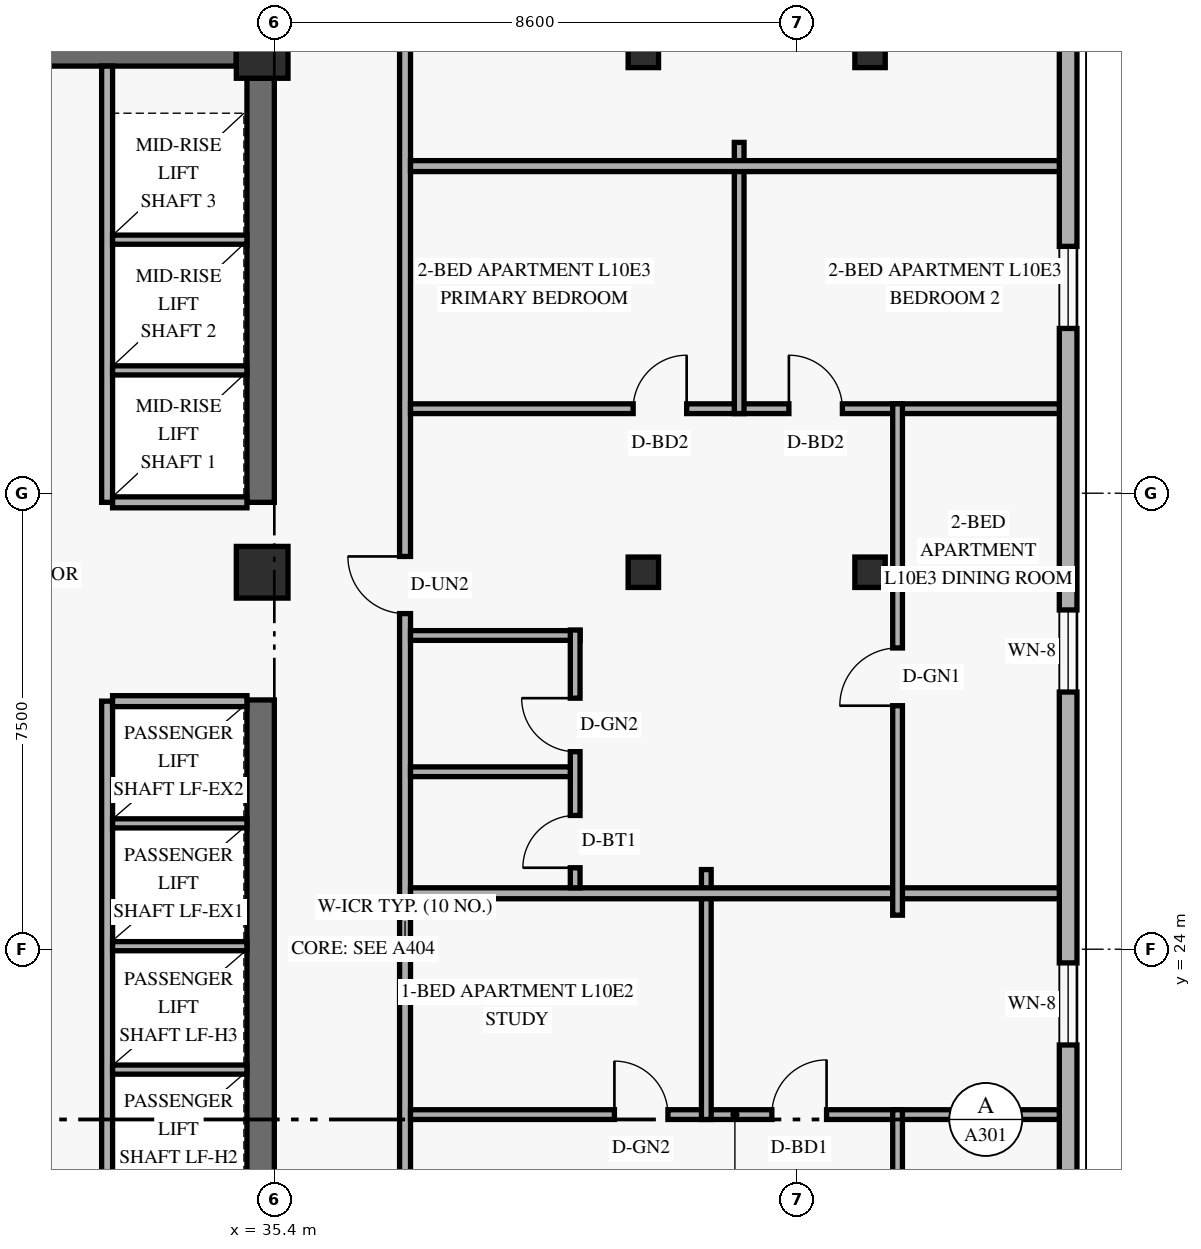
"""IFC4 building model, lengths in metres.
Left out: names, types, materials, properties, quantities, classifications, styles, units other than length and angle.
Written with IfcOpenShell. Run it as: python <this file> out.ifc"""

import sys

from ifc_helpers import new_model, si_unit, direction, frame, frame_2d, origin, origin_2d, place, context, subcontext, project, spatial, rectangle, hollow_rectangle, extrude, element, fill, save


model = new_model("IFC4")
c1 = context("Model", 3, precision=1e-05, world=origin(), true_north=direction((0.0, 1.0)))
c2 = subcontext(c1, "Body", "Model", "MODEL_VIEW")
j1 = project(units=[si_unit("LENGTHUNIT", "METRE"), si_unit("PLANEANGLEUNIT", "RADIAN")], contexts=[c1])
p1 = place(None, origin())
s1 = spatial("IfcSite", under=j1, at=p1, CompositionType="ELEMENT")
p2 = place(p1, origin())
s2 = spatial("IfcBuilding", under=s1, at=p2, CompositionType="ELEMENT")
p3 = place(p2, frame((0.0, 0.0, 42.0)))
s3 = spatial("IfcBuildingStorey", under=s2, at=p3, CompositionType="ELEMENT", Elevation=42.0)
p4 = place(p3, frame((35.175, 17.975, 0.0), z_axis=(0.0, 0.0, 1.0), x_axis=(0.0, 1.0, 0.0)))
e1 = element("IfcWall", 1, at=p4, inside=s3, PredefinedType="SHEAR", context=c2, shape_type="SweptSolid", body=[
    extrude(rectangle(XDim=10.125, YDim=0.45, at=frame_2d((5.062, 0.0))), origin(), (0.0, 0.0, 1.0), 2.667),
])
p5 = place(p3, frame((35.175, 31.35, 0.0), z_axis=(0.0, 0.0, 1.0), x_axis=(0.0, 1.0, 0.0)))
e2 = element("IfcWall", 2, at=p5, inside=s3, PredefinedType="SHEAR", context=c2, shape_type="SweptSolid", body=[
    extrude(rectangle(XDim=6.975, YDim=0.45, at=frame_2d((3.487, 0.0))), origin(), (0.0, 0.0, 1.0), 2.667),
])
p6 = place(p3, frame((24.625, 38.75, 0.0), z_axis=(0.0, 0.0, 1.0), x_axis=(1.0, 0.0, 0.0)))
e3 = element("IfcWall", 3, at=p6, inside=s3, PredefinedType="SHEAR", context=c2, shape_type="SweptSolid", body=[
    extrude(rectangle(XDim=10.15, YDim=0.45, at=frame_2d((5.075, 0.0))), origin(), (0.0, 0.0, 1.0), 3.36),
])
for number, where, z_axis, x_axis in (
    (4, (35.2, 30.2, 0.0), (0.0, 0.0, 1.0), (1.0, 0.0, 0.0)),
    (5, (35.2, 38.75, 0.0), (0.0, 0.0, 1.0), (1.0, 0.0, 0.0)),
):
    element("IfcColumn", number, at=place(p3, frame(where, z_axis=z_axis, x_axis=x_axis)), inside=s3, PredefinedType="COLUMN", context=c2, shape_type="SweptSolid", body=[
        extrude(rectangle(XDim=0.85, YDim=0.85, at=origin_2d()), origin(), (0.0, 0.0, 1.0), 3.6),
    ])
for number, where, z_axis, x_axis in (
    (6, (41.406, 30.2, 0.0), (0.035, 0.0, 0.999), (0.0, 1.0, 0.0)),
    (7, (41.406, 38.75, 0.0), (0.035, 0.0, 0.999), (0.0, 1.0, 0.0)),
):
    element("IfcColumn", number, at=place(p3, frame(where, z_axis=z_axis, x_axis=x_axis)), inside=s3, PredefinedType="COLUMN", context=c2, shape_type="SweptSolid", body=[
        extrude(hollow_rectangle(XDim=0.5, YDim=0.5, WallThickness=0.022, at=origin_2d()), origin(), (0.0, 0.0, 1.0), 3.602),
    ])
for number, where, z_axis, x_axis in (
    (8, (45.093, 30.2, 0.0), (0.058, 0.0, 0.998), (0.0, 1.0, 0.0)),
    (9, (45.093, 38.75, 0.0), (0.058, 0.0, 0.998), (0.0, 1.0, 0.0)),
):
    element("IfcColumn", number, at=place(p3, frame(where, z_axis=z_axis, x_axis=x_axis)), inside=s3, PredefinedType="COLUMN", context=c2, shape_type="SweptSolid", body=[
        extrude(hollow_rectangle(XDim=0.5, YDim=0.5, WallThickness=0.022, at=origin_2d()), origin(), (0.0, 0.0, 1.0), 3.606),
    ])
p7 = place(p3, frame((48.455, 4.62, 0.0), z_axis=(0.0, 0.0, 1.0), x_axis=(0.0, 1.0, 0.0)))
e10 = element("IfcWall", 10, at=p7, inside=s3, PredefinedType="SOLIDWALL", context=c2, shape_type="SweptSolid", body=[
    extrude(rectangle(XDim=38.76, YDim=0.29, at=frame_2d((19.38, 0.0))), origin(), (0.0, 0.0, 1.0), 3.36),
])
p8 = place(p7, frame((3.035, 0.0, 0.85)))
e11 = element("IfcOpeningElement", 11, at=p8, cuts=e10, PredefinedType="OPENING", context=c2, shape_type="SweptSolid", body=[
    extrude(rectangle(XDim=1.35, YDim=1.55, at=frame_2d((0.675, 0.775))), frame((0.0, 0.155, 0.0), z_axis=(0.0, -1.0, 0.0), x_axis=(1.0, 0.0, 0.0)), (0.0, 0.0, 1.0), 0.31),
])
p9 = place(p7, frame((11.365, 0.0, 0.85)))
e12 = element("IfcOpeningElement", 12, at=p9, cuts=e10, PredefinedType="OPENING", context=c2, shape_type="SweptSolid", body=[
    extrude(rectangle(XDim=1.35, YDim=1.55, at=frame_2d((0.675, 0.775))), frame((0.0, 0.155, 0.0), z_axis=(0.0, -1.0, 0.0), x_axis=(1.0, 0.0, 0.0)), (0.0, 0.0, 1.0), 0.31),
])
p10 = place(p7, frame((17.805, 0.0, 0.85)))
e13 = element("IfcOpeningElement", 13, at=p10, cuts=e10, PredefinedType="OPENING", context=c2, shape_type="SweptSolid", body=[
    extrude(rectangle(XDim=1.35, YDim=1.55, at=frame_2d((0.675, 0.775))), frame((0.0, 0.155, 0.0), z_axis=(0.0, -1.0, 0.0), x_axis=(1.0, 0.0, 0.0)), (0.0, 0.0, 1.0), 0.31),
])
p11 = place(p7, frame((23.61, 0.0, 0.85)))
e14 = element("IfcOpeningElement", 14, at=p11, cuts=e10, PredefinedType="OPENING", context=c2, shape_type="SweptSolid", body=[
    extrude(rectangle(XDim=1.35, YDim=1.55, at=frame_2d((0.675, 0.775))), frame((0.0, 0.155, 0.0), z_axis=(0.0, -1.0, 0.0), x_axis=(1.0, 0.0, 0.0)), (0.0, 0.0, 1.0), 0.31),
])
p12 = place(p7, frame((29.59, 0.0, 0.85)))
e15 = element("IfcOpeningElement", 15, at=p12, cuts=e10, PredefinedType="OPENING", context=c2, shape_type="SweptSolid", body=[
    extrude(rectangle(XDim=1.35, YDim=1.55, at=frame_2d((0.675, 0.775))), frame((0.0, 0.155, 0.0), z_axis=(0.0, -1.0, 0.0), x_axis=(1.0, 0.0, 0.0)), (0.0, 0.0, 1.0), 0.31),
])
p13 = place(p7, frame((34.835, 0.0, 0.85)))
e16 = element("IfcOpeningElement", 16, at=p13, cuts=e10, PredefinedType="OPENING", context=c2, shape_type="SweptSolid", body=[
    extrude(rectangle(XDim=1.35, YDim=1.55, at=frame_2d((0.675, 0.775))), frame((0.0, 0.155, 0.0), z_axis=(0.0, -1.0, 0.0), x_axis=(1.0, 0.0, 0.0)), (0.0, 0.0, 1.0), 0.31),
])
p14 = place(p3, frame((32.65, 18.02, 0.0), z_axis=(0.0, 0.0, 1.0), x_axis=(0.0, 1.0, 0.0)))
e17 = element("IfcWall", 17, at=p14, inside=s3, PredefinedType="STANDARD", context=c2, shape_type="SweptSolid", body=[
    extrude(rectangle(XDim=10.06, YDim=0.18, at=frame_2d((5.03, 0.0))), origin(), (0.0, 0.0, 1.0), 3.36),
])
p15 = place(p3, frame((32.74, 28.08, 0.0), z_axis=(0.0, 0.0, 1.0), x_axis=(1.0, 0.0, 0.0)))
e18 = element("IfcWall", 18, at=p15, inside=s3, PredefinedType="STANDARD", context=c2, shape_type="SweptSolid", body=[
    extrude(rectangle(XDim=2.21, YDim=0.18, at=frame_2d((1.105, 0.0))), origin(), (0.0, 0.0, 1.0), 3.36),
])
for number, where, z_axis, x_axis in (
    (19, (32.74, 22.02, 0.0), (0.0, 0.0, 1.0), (1.0, 0.0, 0.0)),
    (20, (32.74, 24.05, 0.0), (0.0, 0.0, 1.0), (1.0, 0.0, 0.0)),
    (21, (32.74, 26.07, 0.0), (0.0, 0.0, 1.0), (1.0, 0.0, 0.0)),
):
    element("IfcWall", number, at=place(p3, frame(where, z_axis=z_axis, x_axis=x_axis)), inside=s3, PredefinedType="STANDARD", context=c2, shape_type="SweptSolid", body=[
        extrude(rectangle(XDim=2.21, YDim=0.15, at=frame_2d((1.105, 0.0))), origin(), (0.0, 0.0, 1.0), 3.36),
    ])
p16 = place(p3, frame((32.65, 31.35, 0.0), z_axis=(0.0, 0.0, 1.0), x_axis=(0.0, 1.0, 0.0)))
e22 = element("IfcWall", 22, at=p16, inside=s3, PredefinedType="STANDARD", context=c2, shape_type="SweptSolid", body=[
    extrude(rectangle(XDim=7.175, YDim=0.18, at=frame_2d((3.587, 0.0))), origin(), (0.0, 0.0, 1.0), 3.36),
])
p17 = place(p3, frame((32.74, 31.35, 0.0), z_axis=(0.0, 0.0, 1.0), x_axis=(1.0, 0.0, 0.0)))
e23 = element("IfcWall", 23, at=p17, inside=s3, PredefinedType="STANDARD", context=c2, shape_type="SweptSolid", body=[
    extrude(rectangle(XDim=2.21, YDim=0.18, at=frame_2d((1.105, 0.0))), origin(), (0.0, 0.0, 1.0), 3.36),
])
for number, where, z_axis, x_axis in (
    (24, (32.74, 33.52, 0.0), (0.0, 0.0, 1.0), (1.0, 0.0, 0.0)),
    (25, (32.74, 35.67, 0.0), (0.0, 0.0, 1.0), (1.0, 0.0, 0.0)),
):
    element("IfcWall", number, at=place(p3, frame(where, z_axis=z_axis, x_axis=x_axis)), inside=s3, PredefinedType="STANDARD", context=c2, shape_type="SweptSolid", body=[
        extrude(rectangle(XDim=2.21, YDim=0.15, at=frame_2d((1.105, 0.0))), origin(), (0.0, 0.0, 1.0), 3.36),
    ])
p18 = place(p3, frame((37.55, 1.29, 0.0), z_axis=(0.0, 0.0, 1.0), x_axis=(0.0, 1.0, 0.0)))
e26 = element("IfcWall", 26, at=p18, inside=s3, PredefinedType="STANDARD", context=c2, shape_type="SweptSolid", body=[
    extrude(rectangle(XDim=45.42, YDim=0.18, at=frame_2d((22.71, 0.0))), origin(), (0.0, 0.0, 1.0), 2.649),
])
p19 = place(p18, frame((4.46, 0.0, 0.0)))
e27 = element("IfcOpeningElement", 27, at=p19, cuts=e26, PredefinedType="OPENING", context=c2, shape_type="SweptSolid", body=[
    extrude(rectangle(XDim=0.94, YDim=2.15, at=frame_2d((0.47, 1.075))), frame((0.0, 0.1, 0.0), z_axis=(0.0, -1.0, 0.0), x_axis=(1.0, 0.0, 0.0)), (0.0, 0.0, 1.0), 0.2),
])
p20 = place(p18, frame((15.907, 0.0, 0.0)))
e28 = element("IfcOpeningElement", 28, at=p20, cuts=e26, PredefinedType="OPENING", context=c2, shape_type="SweptSolid", body=[
    extrude(rectangle(XDim=0.94, YDim=2.15, at=frame_2d((0.47, 1.075))), frame((0.0, 0.1, 0.0), z_axis=(0.0, -1.0, 0.0), x_axis=(1.0, 0.0, 0.0)), (0.0, 0.0, 1.0), 0.2),
])
p21 = place(p18, frame((28.23, 0.0, 0.0)))
e29 = element("IfcOpeningElement", 29, at=p21, cuts=e26, PredefinedType="OPENING", context=c2, shape_type="SweptSolid", body=[
    extrude(rectangle(XDim=0.94, YDim=2.15, at=frame_2d((0.47, 1.075))), frame((0.0, 0.1, 0.0), z_axis=(0.0, -1.0, 0.0), x_axis=(1.0, 0.0, 0.0)), (0.0, 0.0, 1.0), 0.2),
])
p22 = place(p18, frame((40.02, 0.0, 0.0)))
e30 = element("IfcOpeningElement", 30, at=p22, cuts=e26, PredefinedType="OPENING", context=c2, shape_type="SweptSolid", body=[
    extrude(rectangle(XDim=0.94, YDim=2.15, at=frame_2d((0.47, 1.075))), frame((0.0, 0.1, 0.0), z_axis=(0.0, -1.0, 0.0), x_axis=(1.0, 0.0, 0.0)), (0.0, 0.0, 1.0), 0.2),
])
p23 = place(p3, frame((35.42, 38.75, 0.0), z_axis=(0.0, 0.0, 1.0), x_axis=(0.0, 1.0, 0.0)))
e31 = element("IfcWall", 31, at=p23, inside=s3, PredefinedType="STANDARD", context=c2, shape_type="SweptSolid", body=[
    extrude(rectangle(XDim=0.51, YDim=0.18, at=frame_2d((0.255, 0.0))), origin(), (0.0, 0.0, 1.0), 3.36),
])
p24 = place(p3, frame((37.64, 21.28, 0.0), z_axis=(0.0, 0.0, 1.0), x_axis=(1.0, 0.0, 0.0)))
e32 = element("IfcWall", 32, at=p24, inside=s3, PredefinedType="PARTITIONING", context=c2, shape_type="SweptSolid", body=[
    extrude(rectangle(XDim=10.67, YDim=0.16, at=frame_2d((5.335, 0.0))), origin(), (0.0, 0.0, 1.0), 2.649),
])
p25 = place(p24, frame((3.353, 0.0, 0.0)))
e33 = element("IfcOpeningElement", 33, at=p25, cuts=e32, PredefinedType="OPENING", context=c2, shape_type="SweptSolid", body=[
    extrude(rectangle(XDim=0.88, YDim=2.12, at=frame_2d((0.44, 1.06))), frame((0.0, 0.09, 0.0), z_axis=(0.0, -1.0, 0.0), x_axis=(1.0, 0.0, 0.0)), (0.0, 0.0, 1.0), 0.18),
])
p26 = place(p24, frame((5.942, 0.0, 0.0)))
e34 = element("IfcOpeningElement", 34, at=p26, cuts=e32, PredefinedType="OPENING", context=c2, shape_type="SweptSolid", body=[
    extrude(rectangle(XDim=0.9, YDim=2.14, at=frame_2d((0.45, 1.07))), frame((0.0, 0.09, 0.0), z_axis=(0.0, -1.0, 0.0), x_axis=(1.0, 0.0, 0.0)), (0.0, 0.0, 1.0), 0.18),
])
p27 = place(p3, frame((45.65, 11.68, 0.0), z_axis=(0.0, 0.0, 1.0), x_axis=(0.0, 1.0, 0.0)))
e35 = element("IfcWall", 35, at=p27, inside=s3, PredefinedType="PARTITIONING", context=c2, shape_type="SweptSolid", body=[
    extrude(rectangle(XDim=9.68, YDim=0.16, at=frame_2d((4.84, 0.0))), origin(), (0.0, 0.0, 1.0), 3.36),
])
p28 = place(p27, frame((4.08, 0.0, 0.0)))
e36 = element("IfcOpeningElement", 36, at=p28, cuts=e35, PredefinedType="OPENING", context=c2, shape_type="SweptSolid", body=[
    extrude(rectangle(XDim=0.95, YDim=2.15, at=frame_2d((0.475, 1.075))), frame((0.0, 0.09, 0.0), z_axis=(0.0, -1.0, 0.0), x_axis=(1.0, 0.0, 0.0)), (0.0, 0.0, 1.0), 0.18),
])
p29 = place(p3, frame((42.504, 21.2, 0.0), z_axis=(0.0, 0.0, 1.0), x_axis=(0.0, 1.0, 0.0)))
e37 = element("IfcWall", 37, at=p29, inside=s3, PredefinedType="PARTITIONING", context=c2, shape_type="SweptSolid", body=[
    extrude(rectangle(XDim=4.11, YDim=0.16, at=frame_2d((2.055, 0.0))), origin(), (0.0, 0.0, 1.0), 2.932),
])
p30 = place(p3, frame((37.64, 24.92, 0.0), z_axis=(0.0, 0.0, 1.0), x_axis=(1.0, 0.0, 0.0)))
e38 = element("IfcWall", 38, at=p30, inside=s3, PredefinedType="PARTITIONING", context=c2, shape_type="SweptSolid", body=[
    extrude(rectangle(XDim=10.67, YDim=0.18, at=frame_2d((5.335, 0.0))), origin(), (0.0, 0.0, 1.0), 2.649),
])
p31 = place(p3, frame((37.64, 32.89, 0.0), z_axis=(0.0, 0.0, 1.0), x_axis=(1.0, 0.0, 0.0)))
e39 = element("IfcWall", 39, at=p31, inside=s3, PredefinedType="PARTITIONING", context=c2, shape_type="SweptSolid", body=[
    extrude(rectangle(XDim=10.67, YDim=0.16, at=frame_2d((5.335, 0.0))), origin(), (0.0, 0.0, 1.0), 2.649),
])
p32 = place(p31, frame((3.662, 0.0, 0.0)))
e40 = element("IfcOpeningElement", 40, at=p32, cuts=e39, PredefinedType="OPENING", context=c2, shape_type="SweptSolid", body=[
    extrude(rectangle(XDim=0.88, YDim=2.14, at=frame_2d((0.44, 1.07))), frame((0.0, 0.09, 0.0), z_axis=(0.0, -1.0, 0.0), x_axis=(1.0, 0.0, 0.0)), (0.0, 0.0, 1.0), 0.18),
])
p33 = place(p31, frame((6.222, 0.0, 0.0)))
e41 = element("IfcOpeningElement", 41, at=p33, cuts=e39, PredefinedType="OPENING", context=c2, shape_type="SweptSolid", body=[
    extrude(rectangle(XDim=0.88, YDim=2.14, at=frame_2d((0.44, 1.07))), frame((0.0, 0.09, 0.0), z_axis=(0.0, -1.0, 0.0), x_axis=(1.0, 0.0, 0.0)), (0.0, 0.0, 1.0), 0.18),
])
p34 = place(p3, frame((37.64, 29.16, 0.0), z_axis=(0.0, 0.0, 1.0), x_axis=(1.0, 0.0, 0.0)))
e42 = element("IfcWall", 42, at=p34, inside=s3, PredefinedType="PLUMBINGWALL", context=c2, shape_type="SweptSolid", body=[
    extrude(rectangle(XDim=2.788, YDim=0.16, at=frame_2d((1.394, 0.0))), origin(), (0.0, 0.0, 1.0), 3.36),
])
p35 = place(p3, frame((40.348, 25.01, 0.0), z_axis=(0.0, 0.0, 1.0), x_axis=(0.0, 1.0, 0.0)))
e43 = element("IfcWall", 43, at=p35, inside=s3, PredefinedType="PLUMBINGWALL", context=c2, shape_type="SweptSolid", body=[
    extrude(rectangle(XDim=4.24, YDim=0.16, at=frame_2d((2.12, 0.0))), origin(), (0.0, 0.0, 1.0), 3.36),
])
p36 = place(p35, frame((0.33, 0.0, 0.0)))
e44 = element("IfcOpeningElement", 44, at=p36, cuts=e43, PredefinedType="OPENING", context=c2, shape_type="SweptSolid", body=[
    extrude(rectangle(XDim=0.86, YDim=2.12, at=frame_2d((0.43, 1.06))), frame((0.0, 0.09, 0.0), z_axis=(0.0, -1.0, 0.0), x_axis=(1.0, 0.0, 0.0)), (0.0, 0.0, 1.0), 0.18),
])
p37 = place(p35, frame((2.239, 0.0, 0.0)))
e45 = element("IfcOpeningElement", 45, at=p37, cuts=e43, PredefinedType="OPENING", context=c2, shape_type="SweptSolid", body=[
    extrude(rectangle(XDim=0.88, YDim=2.12, at=frame_2d((0.44, 1.06))), frame((0.0, 0.09, 0.0), z_axis=(0.0, -1.0, 0.0), x_axis=(1.0, 0.0, 0.0)), (0.0, 0.0, 1.0), 0.18),
])
p38 = place(p3, frame((37.64, 26.919, 0.0), z_axis=(0.0, 0.0, 1.0), x_axis=(1.0, 0.0, 0.0)))
e46 = element("IfcWall", 46, at=p38, inside=s3, PredefinedType="PLUMBINGWALL", context=c2, shape_type="SweptSolid", body=[
    extrude(rectangle(XDim=2.628, YDim=0.16, at=frame_2d((1.314, 0.0))), origin(), (0.0, 0.0, 1.0), 3.36),
])
p39 = place(p3, frame((45.65, 24.56, 0.0), z_axis=(0.0, 0.0, 1.0), x_axis=(0.0, 1.0, 0.0)))
e47 = element("IfcWall", 47, at=p39, inside=s3, PredefinedType="PARTITIONING", context=c2, shape_type="SweptSolid", body=[
    extrude(rectangle(XDim=8.41, YDim=0.16, at=frame_2d((4.205, 0.0))), origin(), (0.0, 0.0, 1.0), 3.36),
])
p40 = place(p39, frame((3.445, 0.0, 0.0)))
e48 = element("IfcOpeningElement", 48, at=p40, cuts=e47, PredefinedType="OPENING", context=c2, shape_type="SweptSolid", body=[
    extrude(rectangle(XDim=0.95, YDim=2.15, at=frame_2d((0.475, 1.075))), frame((0.0, 0.09, 0.0), z_axis=(0.0, -1.0, 0.0), x_axis=(1.0, 0.0, 0.0)), (0.0, 0.0, 1.0), 0.18),
])
p41 = place(p3, frame((43.045, 32.81, 0.0), z_axis=(0.0, 0.0, 1.0), x_axis=(0.0, 1.0, 0.0)))
e49 = element("IfcWall", 49, at=p41, inside=s3, PredefinedType="PARTITIONING", context=c2, shape_type="SweptSolid", body=[
    extrude(rectangle(XDim=4.46, YDim=0.16, at=frame_2d((2.23, 0.0))), origin(), (0.0, 0.0, 1.0), 2.932),
])
p42 = place(p3, frame((37.64, 36.88, 0.0), z_axis=(0.0, 0.0, 1.0), x_axis=(1.0, 0.0, 0.0)))
e50 = element("IfcWall", 50, at=p42, inside=s3, PredefinedType="PARTITIONING", context=c2, shape_type="SweptSolid", body=[
    extrude(rectangle(XDim=10.67, YDim=0.18, at=frame_2d((5.335, 0.0))), origin(), (0.0, 0.0, 1.0), 2.649),
])
p43 = place(p10, origin())
e51 = element("IfcWindow", 51, at=p43, inside=s3, PartitioningType="SINGLE_PANEL", PredefinedType="WINDOW", context=c2, shape_type="SweptSolid", body=[
    extrude(rectangle(XDim=1.35, YDim=1.55, at=frame_2d((0.675, 0.775))), frame((0.0, 0.03, 0.0), z_axis=(0.0, -1.0, 0.0), x_axis=(1.0, 0.0, 0.0)), (0.0, 0.0, 1.0), 0.06),
])
fill(e13, e51)
p44 = place(p11, origin())
e52 = element("IfcWindow", 52, at=p44, inside=s3, PartitioningType="SINGLE_PANEL", PredefinedType="WINDOW", context=c2, shape_type="SweptSolid", body=[
    extrude(rectangle(XDim=1.35, YDim=1.55, at=frame_2d((0.675, 0.775))), frame((0.0, 0.03, 0.0), z_axis=(0.0, -1.0, 0.0), x_axis=(1.0, 0.0, 0.0)), (0.0, 0.0, 1.0), 0.06),
])
fill(e14, e52)
p45 = place(p12, origin())
e53 = element("IfcWindow", 53, at=p45, inside=s3, PartitioningType="SINGLE_PANEL", PredefinedType="WINDOW", context=c2, shape_type="SweptSolid", body=[
    extrude(rectangle(XDim=1.35, YDim=1.55, at=frame_2d((0.675, 0.775))), frame((0.0, 0.03, 0.0), z_axis=(0.0, -1.0, 0.0), x_axis=(1.0, 0.0, 0.0)), (0.0, 0.0, 1.0), 0.06),
])
fill(e15, e53)
p46 = place(p25, origin())
e54 = element("IfcDoor", 54, at=p46, inside=s3, OperationType="SINGLE_SWING_LEFT", PredefinedType="DOOR", context=c2, shape_type="SweptSolid", body=[
    extrude(rectangle(XDim=0.88, YDim=2.12, at=frame_2d((0.44, 1.06))), frame((0.0, 0.025, 0.0), z_axis=(0.0, -1.0, 0.0), x_axis=(1.0, 0.0, 0.0)), (0.0, 0.0, 1.0), 0.05),
])
fill(e33, e54)
p47 = place(p26, origin())
e55 = element("IfcDoor", 55, at=p47, inside=s3, OperationType="SINGLE_SWING_RIGHT", PredefinedType="DOOR", context=c2, shape_type="SweptSolid", body=[
    extrude(rectangle(XDim=0.9, YDim=2.14, at=frame_2d((0.45, 1.07))), frame((0.0, 0.025, 0.0), z_axis=(0.0, -1.0, 0.0), x_axis=(1.0, 0.0, 0.0)), (0.0, 0.0, 1.0), 0.05),
])
fill(e34, e55)
p48 = place(p40, origin())
e56 = element("IfcDoor", 56, at=p48, inside=s3, OperationType="SINGLE_SWING_LEFT", PredefinedType="DOOR", context=c2, shape_type="SweptSolid", body=[
    extrude(rectangle(XDim=0.95, YDim=2.15, at=frame_2d((0.475, 1.075))), frame((0.0, 0.025, 0.0), z_axis=(0.0, -1.0, 0.0), x_axis=(1.0, 0.0, 0.0)), (0.0, 0.0, 1.0), 0.05),
])
fill(e48, e56)
p49 = place(p21, origin())
e57 = element("IfcDoor", 57, at=p49, inside=s3, OperationType="SINGLE_SWING_RIGHT", PredefinedType="DOOR", context=c2, shape_type="SweptSolid", body=[
    extrude(rectangle(XDim=0.94, YDim=2.15, at=frame_2d((0.47, 1.075))), frame((0.0, 0.025, 0.0), z_axis=(0.0, -1.0, 0.0), x_axis=(1.0, 0.0, 0.0)), (0.0, 0.0, 1.0), 0.05),
])
fill(e29, e57)
p50 = place(p36, origin())
e58 = element("IfcDoor", 58, at=p50, inside=s3, OperationType="SINGLE_SWING_LEFT", PredefinedType="DOOR", context=c2, shape_type="SweptSolid", body=[
    extrude(rectangle(XDim=0.86, YDim=2.12, at=frame_2d((0.43, 1.06))), frame((0.0, 0.025, 0.0), z_axis=(0.0, -1.0, 0.0), x_axis=(1.0, 0.0, 0.0)), (0.0, 0.0, 1.0), 0.05),
])
fill(e44, e58)
p51 = place(p37, origin())
e59 = element("IfcDoor", 59, at=p51, inside=s3, OperationType="SINGLE_SWING_RIGHT", PredefinedType="DOOR", context=c2, shape_type="SweptSolid", body=[
    extrude(rectangle(XDim=0.88, YDim=2.12, at=frame_2d((0.44, 1.06))), frame((0.0, 0.025, 0.0), z_axis=(0.0, -1.0, 0.0), x_axis=(1.0, 0.0, 0.0)), (0.0, 0.0, 1.0), 0.05),
])
fill(e45, e59)
p52 = place(p32, origin())
e60 = element("IfcDoor", 60, at=p52, inside=s3, OperationType="SINGLE_SWING_RIGHT", PredefinedType="DOOR", context=c2, shape_type="SweptSolid", body=[
    extrude(rectangle(XDim=0.88, YDim=2.14, at=frame_2d((0.44, 1.07))), frame((0.0, 0.025, 0.0), z_axis=(0.0, -1.0, 0.0), x_axis=(1.0, 0.0, 0.0)), (0.0, 0.0, 1.0), 0.05),
])
fill(e40, e60)
p53 = place(p33, origin())
e61 = element("IfcDoor", 61, at=p53, inside=s3, OperationType="SINGLE_SWING_LEFT", PredefinedType="DOOR", context=c2, shape_type="SweptSolid", body=[
    extrude(rectangle(XDim=0.88, YDim=2.14, at=frame_2d((0.44, 1.07))), frame((0.0, 0.025, 0.0), z_axis=(0.0, -1.0, 0.0), x_axis=(1.0, 0.0, 0.0)), (0.0, 0.0, 1.0), 0.05),
])
fill(e41, e61)
save(model, sys.argv[1])
